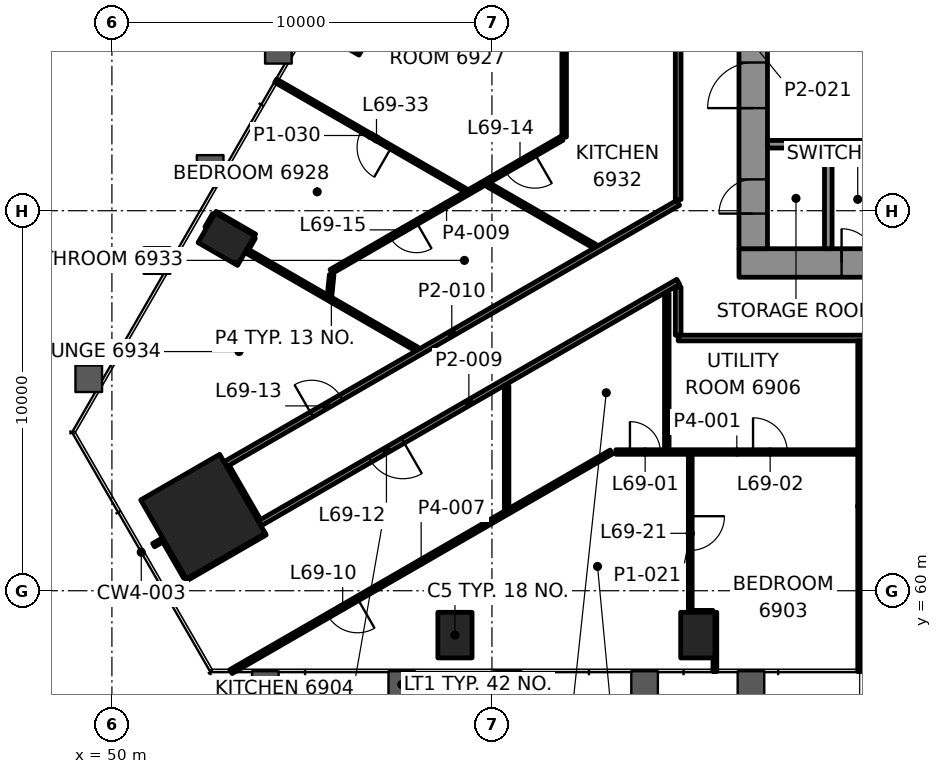
"""IFC4 building model, lengths in metres.
Left out: names, types, materials, properties, quantities, classifications, styles, units other than length and angle.
Written with IfcOpenShell. Run it as: python <this file> out.ifc"""

import sys

from ifc_helpers import new_model, si_unit, direction, frame, frame_2d, origin, origin_2d, place, context, subcontext, project, spatial, rectangle, hollow_rectangle, extrude, element, fill, save


model = new_model("IFC4")
c1 = context("Model", 3, precision=1e-05, world=origin(), true_north=direction((0.0, 1.0)))
c2 = subcontext(c1, "Body", "Model", "MODEL_VIEW")
j1 = project(units=[si_unit("LENGTHUNIT", "METRE"), si_unit("PLANEANGLEUNIT", "RADIAN")], contexts=[c1])
p1 = place(None, origin())
s1 = spatial("IfcSite", under=j1, at=p1, CompositionType="ELEMENT")
p2 = place(p1, origin())
s2 = spatial("IfcBuilding", under=s1, at=p2, CompositionType="ELEMENT")
p3 = place(p2, frame((0.0, 0.0, 288.1)))
s3 = spatial("IfcBuildingStorey", under=s2, at=p3, CompositionType="ELEMENT", Elevation=288.1)
p4 = place(p3, frame((52.396, 61.95, 0.0), z_axis=(0.0, 0.0, 1.0), x_axis=(0.5, -0.866025403784, 0.0)))
e1 = element("IfcColumn", 1, at=p4, inside=s3, PredefinedType="COLUMN", context=c2, shape_type="SweptSolid", body=[
    extrude(rectangle(XDim=2.4, YDim=2.4, at=origin_2d()), origin(), (0.0, 0.0, 1.0), 3.5),
])
for number, where, z_axis, x_axis in (
    (2, (59.027, 58.832, -0.0), (0.0, 0.0, 1.0), (1.0, 0.0, 0.0)),
    (3, (65.416, 58.832, -0.0), (0.0, 0.0, 1.0), (1.0, 0.0, 0.0)),
    (4, (56.206, 74.784, -0.0), (0.0, 0.0, 1.0), (-0.5, -0.866, 0.0)),
    (5, (53.011, 69.251, -0.0), (0.0, 0.0, 1.0), (-0.5, -0.866, 0.0)),
):
    element("IfcColumn", number, at=place(p3, frame(where, z_axis=z_axis, x_axis=x_axis)), inside=s3, PredefinedType="COLUMN", context=c2, shape_type="SweptSolid", body=[
        extrude(hollow_rectangle(XDim=0.9, YDim=1.2, WallThickness=0.06, at=origin_2d()), origin(), (0.0, 0.0, 1.0), 3.5),
    ])
p5 = place(p3, frame((66.5, 68.625, 0.0), z_axis=(0.0, 0.0, 1.0), x_axis=(1.0, 0.0, 0.0)))
e6 = element("IfcWall", 6, at=p5, inside=s3, PredefinedType="SHEAR", context=c2, shape_type="SweptSolid", body=[
    extrude(rectangle(XDim=17.0, YDim=0.75, at=frame_2d((8.5, 0.0))), origin(), (0.0, 0.0, 1.0), 3.3),
])
p6 = place(p5, frame((2.7, 0.0, 0.0)))
e7 = element("IfcOpeningElement", 7, at=p6, cuts=e6, PredefinedType="OPENING", context=c2, shape_type="SweptSolid", body=[
    extrude(rectangle(XDim=0.9, YDim=2.1, at=frame_2d((0.45, 1.05))), frame((0.0, 0.385, 0.0), z_axis=(0.0, -1.0, 0.0), x_axis=(1.0, 0.0, 0.0)), (0.0, 0.0, 1.0), 0.77),
])
p7 = place(p3, frame((66.875, 69.0, 0.0), z_axis=(0.0, 0.0, 1.0), x_axis=(0.0, 1.0, 0.0)))
e8 = element("IfcWall", 8, at=p7, inside=s3, PredefinedType="SHEAR", context=c2, shape_type="SweptSolid", body=[
    extrude(rectangle(XDim=12.0, YDim=0.75, at=frame_2d((6.0, 0.0))), origin(), (0.0, 0.0, 1.0), 3.3),
])
p8 = place(p7, frame((3.7, 0.0, 0.0)))
e9 = element("IfcOpeningElement", 9, at=p8, cuts=e8, PredefinedType="OPENING", context=c2, shape_type="SweptSolid", body=[
    extrude(rectangle(XDim=1.2, YDim=2.1, at=frame_2d((0.6, 1.05))), frame((0.0, 0.385, 0.0), z_axis=(0.0, -1.0, 0.0), x_axis=(1.0, 0.0, 0.0)), (0.0, 0.0, 1.0), 0.77),
])
p9 = place(p7, frame((0.925, 0.0, 0.0)))
e10 = element("IfcOpeningElement", 10, at=p9, cuts=e8, PredefinedType="OPENING", context=c2, shape_type="SweptSolid", body=[
    extrude(rectangle(XDim=0.9, YDim=2.1, at=frame_2d((0.45, 1.05))), frame((0.0, 0.385, 0.0), z_axis=(0.0, -1.0, 0.0), x_axis=(1.0, 0.0, 0.0)), (0.0, 0.0, 1.0), 0.77),
])
p10 = place(p3, frame((65.268, 59.432, 0.0), z_axis=(0.0, 0.0, 1.0), x_axis=(1.0, 0.0, 0.0)))
e11 = element("IfcWall", 11, at=p10, inside=s3, PredefinedType="PARTITIONING", context=c2, shape_type="SweptSolid", body=[
    extrude(rectangle(XDim=0.548, YDim=0.1, at=frame_2d((0.274, 0.0))), origin(), (0.0, 0.0, 1.0), 2.7),
])
p11 = place(p3, frame((63.261, 63.65, 0.0), z_axis=(0.0, 0.0, 1.0), x_axis=(1.0, 0.0, 0.0)))
e12 = element("IfcWall", 12, at=p11, inside=s3, PredefinedType="PARTITIONING", context=c2, shape_type="SweptSolid", body=[
    extrude(rectangle(XDim=6.364, YDim=0.12, at=frame_2d((3.182, 0.0))), origin(), (0.0, 0.0, 1.0), 2.7),
])
p12 = place(p11, frame((0.37, 0.0, 0.0)))
e13 = element("IfcOpeningElement", 13, at=p12, cuts=e12, PredefinedType="OPENING", context=c2, shape_type="SweptSolid", body=[
    extrude(rectangle(XDim=0.8, YDim=2.1, at=frame_2d((0.4, 1.05))), frame((0.0, 0.07, 0.0), z_axis=(0.0, -1.0, 0.0), x_axis=(1.0, 0.0, 0.0)), (0.0, 0.0, 1.0), 0.14),
])
p13 = place(p11, frame((3.609, 0.0, 0.0)))
e14 = element("IfcOpeningElement", 14, at=p13, cuts=e12, PredefinedType="OPENING", context=c2, shape_type="SweptSolid", body=[
    extrude(rectangle(XDim=0.9, YDim=2.1, at=frame_2d((0.45, 1.05))), frame((0.0, 0.07, 0.0), z_axis=(0.0, -1.0, 0.0), x_axis=(1.0, 0.0, 0.0)), (0.0, 0.0, 1.0), 0.14),
])
p14 = place(p3, frame((85.1, 66.65, 0.0), z_axis=(0.0, 0.0, 1.0), x_axis=(-1.0, 0.0, 0.0)))
e15 = element("IfcWall", 15, at=p14, inside=s3, PredefinedType="PARTITIONING", context=c2, shape_type="SweptSolid", body=[
    extrude(rectangle(XDim=20.2, YDim=0.15, at=frame_2d((10.1, 0.0))), origin(), (0.0, 0.0, 1.0), 2.7),
])
p15 = place(p14, frame((6.405, 0.0, 0.0)))
e16 = element("IfcOpeningElement", 16, at=p15, cuts=e15, PredefinedType="OPENING", context=c2, shape_type="SweptSolid", body=[
    extrude(rectangle(XDim=1.0, YDim=2.1, at=frame_2d((0.5, 1.05))), frame((0.0, 0.085, 0.0), z_axis=(0.0, -1.0, 0.0), x_axis=(1.0, 0.0, 0.0)), (0.0, 0.0, 1.0), 0.17),
])
p16 = place(p14, frame((12.845, 0.0, 0.0)))
e17 = element("IfcOpeningElement", 17, at=p16, cuts=e15, PredefinedType="OPENING", context=c2, shape_type="SweptSolid", body=[
    extrude(rectangle(XDim=0.9, YDim=2.1, at=frame_2d((0.45, 1.05))), frame((0.0, 0.085, 0.0), z_axis=(0.0, -1.0, 0.0), x_axis=(1.0, 0.0, 0.0)), (0.0, 0.0, 1.0), 0.17),
])
p17 = place(p3, frame((63.141, 63.65, 0.0), z_axis=(0.0, 0.0, 1.0), x_axis=(-0.866023045711, -0.500004084281, 0.0)))
e18 = element("IfcWall", 18, at=p17, inside=s3, PredefinedType="PARTITIONING", context=c2, shape_type="SweptSolid", body=[
    extrude(rectangle(XDim=11.556, YDim=0.12, at=frame_2d((5.778, 0.0))), origin(), (0.0, 0.0, 1.0), 2.7),
])
p18 = place(p17, frame((7.713, 0.0, 0.0)))
e19 = element("IfcOpeningElement", 19, at=p18, cuts=e18, PredefinedType="OPENING", context=c2, shape_type="SweptSolid", body=[
    extrude(rectangle(XDim=0.9, YDim=2.1, at=frame_2d((0.45, 1.05))), frame((0.0, 0.07, 0.0), z_axis=(0.0, -1.0, 0.0), x_axis=(1.0, 0.0, 0.0)), (0.0, 0.0, 1.0), 0.14),
])
p19 = place(p3, frame((51.957, 60.311, 0.0), z_axis=(0.0, 0.0, 1.0), x_axis=(0.866036455013, 0.499980858223, 0.0)))
e20 = element("IfcWall", 20, at=p19, inside=s3, PredefinedType="PARTITIONING", context=c2, shape_type="SweptSolid", body=[
    extrude(rectangle(XDim=2.399, YDim=0.1, at=frame_2d((1.199, 0.0))), origin(), (0.0, 0.0, 1.0), 2.7),
])
p20 = place(p3, frame((64.9, 68.13, 0.0), z_axis=(0.0, 0.0, 1.0), x_axis=(-0.866023199005, -0.500003818771, 0.0)))
e21 = element("IfcWall", 21, at=p20, inside=s3, PredefinedType="PARTITIONING", context=c2, shape_type="SweptSolid", body=[
    extrude(rectangle(XDim=12.719, YDim=0.15, at=frame_2d((6.359, 0.0))), origin(), (0.0, 0.0, 1.0), 2.547),
])
p21 = place(p20, frame((8.364, 0.0, 0.0)))
e22 = element("IfcOpeningElement", 22, at=p21, cuts=e21, PredefinedType="OPENING", context=c2, shape_type="SweptSolid", body=[
    extrude(rectangle(XDim=1.0, YDim=2.1, at=frame_2d((0.5, 1.05))), frame((0.0, 0.085, 0.0), z_axis=(0.0, -1.0, 0.0), x_axis=(1.0, 0.0, 0.0)), (0.0, 0.0, 1.0), 0.17),
])
p22 = place(p3, frame((51.097, 61.2, 0.0), z_axis=(0.0, 0.0, 1.0), x_axis=(0.866006330792, 0.500033033937, 0.0)))
e23 = element("IfcWall", 23, at=p22, inside=s3, PredefinedType="PARTITIONING", context=c2, shape_type="SweptSolid", body=[
    extrude(rectangle(XDim=0.25, YDim=0.1, at=frame_2d((0.125, 0.0))), origin(), (0.0, 0.0, 1.0), 2.7),
])
p23 = place(p3, frame((52.986, 63.329, 0.0), z_axis=(0.0, 0.0, 1.0), x_axis=(0.866027482275, 0.499996399932, 0.0)))
e24 = element("IfcWall", 24, at=p23, inside=s3, PredefinedType="PARTITIONING", context=c2, shape_type="SweptSolid", body=[
    extrude(rectangle(XDim=13.757, YDim=0.15, at=frame_2d((6.879, 0.0))), origin(), (0.0, 0.0, 1.0), 2.7),
])
p24 = place(p23, frame((2.62, 0.0, 0.0)))
e25 = element("IfcOpeningElement", 25, at=p24, cuts=e24, PredefinedType="OPENING", context=c2, shape_type="SweptSolid", body=[
    extrude(rectangle(XDim=0.9, YDim=2.1, at=frame_2d((0.45, 1.05))), frame((0.0, 0.085, 0.0), z_axis=(0.0, -1.0, 0.0), x_axis=(1.0, 0.0, 0.0)), (0.0, 0.0, 1.0), 0.17),
])
p25 = place(p3, frame((61.84, 71.906, 0.0), z_axis=(0.0, 0.0, 1.0), x_axis=(-0.866015603583, -0.500016974063, 0.0)))
e26 = element("IfcWall", 26, at=p25, inside=s3, PredefinedType="PARTITIONING", context=c2, shape_type="SweptSolid", body=[
    extrude(rectangle(XDim=7.008, YDim=0.12, at=frame_2d((3.504, 0.0))), origin(), (0.0, 0.0, 1.0), 2.7),
])
p26 = place(p25, frame((0.822, 0.0, 0.0)))
e27 = element("IfcOpeningElement", 27, at=p26, cuts=e26, PredefinedType="OPENING", context=c2, shape_type="SweptSolid", body=[
    extrude(rectangle(XDim=0.9, YDim=2.1, at=frame_2d((0.45, 1.05))), frame((0.0, 0.07, 0.0), z_axis=(0.0, -1.0, 0.0), x_axis=(1.0, 0.0, 0.0)), (0.0, 0.0, 1.0), 0.14),
])
p27 = place(p25, frame((4.418, 0.0, 0.0)))
e28 = element("IfcOpeningElement", 28, at=p27, cuts=e26, PredefinedType="OPENING", context=c2, shape_type="SweptSolid", body=[
    extrude(rectangle(XDim=0.8, YDim=2.1, at=frame_2d((0.4, 1.05))), frame((0.0, 0.07, 0.0), z_axis=(0.0, -1.0, 0.0), x_axis=(1.0, 0.0, 0.0)), (0.0, 0.0, 1.0), 0.14),
])
p28 = place(p3, frame((53.561, 69.003, 0.0), z_axis=(0.0, 0.0, 1.0), x_axis=(0.500241622161, 0.865885858216, 0.0)))
e29 = element("IfcWall", 29, at=p28, inside=s3, PredefinedType="PARTITIONING", context=c2, shape_type="SweptSolid", body=[
    extrude(rectangle(XDim=0.339, YDim=0.1, at=frame_2d((0.169, 0.0))), origin(), (0.0, 0.0, 1.0), 2.7),
])
p29 = place(p3, frame((52.491, 69.551, 0.0), z_axis=(0.0, 0.0, 1.0), x_axis=(0.499951716245, 0.866053278629, 0.0)))
e30 = element("IfcWall", 30, at=p29, inside=s3, PredefinedType="PARTITIONING", context=c2, shape_type="SweptSolid", body=[
    extrude(rectangle(XDim=0.399, YDim=0.1, at=frame_2d((0.2, 0.0))), origin(), (0.0, 0.0, 1.0), 2.7),
])
p30 = place(p3, frame((55.729, 67.781, 0.0), z_axis=(0.0, 0.0, 1.0), x_axis=(0.099548724898, 0.995032688594, 0.0)))
e31 = element("IfcWall", 31, at=p30, inside=s3, PredefinedType="PARTITIONING", context=c2, shape_type="SweptSolid", body=[
    extrude(rectangle(XDim=0.537, YDim=0.12, at=frame_2d((0.269, 0.0))), origin(), (0.0, 0.0, 1.0), 2.7),
])
p31 = place(p3, frame((69.676, 57.872, 0.0), z_axis=(0.0, 0.0, 1.0), x_axis=(0.0, 1.0, 0.0)))
e32 = element("IfcWall", 32, at=p31, inside=s3, PredefinedType="PARTITIONING", context=c2, shape_type="SweptSolid", body=[
    extrude(rectangle(XDim=8.703, YDim=0.1, at=frame_2d((4.352, 0.0))), origin(), (0.0, 0.0, 1.0), 2.688),
])
p32 = place(p3, frame((65.866, 57.872, 0.0), z_axis=(0.0, 0.0, 1.0), x_axis=(0.0, 1.0, 0.0)))
e33 = element("IfcWall", 33, at=p32, inside=s3, PredefinedType="PARTITIONING", context=c2, shape_type="SweptSolid", body=[
    extrude(rectangle(XDim=1.56, YDim=0.1, at=frame_2d((0.78, 0.0))), origin(), (0.0, 0.0, 1.0), 2.688),
])
p33 = place(p3, frame((65.218, 63.59, 0.0), z_axis=(0.0, 0.0, 1.0), x_axis=(0.0, -1.0, 0.0)))
e34 = element("IfcWall", 34, at=p33, inside=s3, PredefinedType="PARTITIONING", context=c2, shape_type="SweptSolid", body=[
    extrude(rectangle(XDim=4.158, YDim=0.1, at=frame_2d((2.079, 0.0))), origin(), (0.0, 0.0, 1.0), 2.7),
])
p34 = place(p33, frame((1.629, 0.0, 0.0)))
e35 = element("IfcOpeningElement", 35, at=p34, cuts=e34, PredefinedType="OPENING", context=c2, shape_type="SweptSolid", body=[
    extrude(rectangle(XDim=0.9, YDim=2.1, at=frame_2d((0.45, 1.05))), frame((0.0, 0.06, 0.0), z_axis=(0.0, -1.0, 0.0), x_axis=(1.0, 0.0, 0.0)), (0.0, 0.0, 1.0), 0.12),
])
p35 = place(p3, frame((64.9, 66.725, 0.0), z_axis=(0.0, 0.0, 1.0), x_axis=(0.0, 1.0, 0.0)))
e36 = element("IfcWall", 36, at=p35, inside=s3, PredefinedType="PARTITIONING", context=c2, shape_type="SweptSolid", body=[
    extrude(rectangle(XDim=1.268, YDim=0.15, at=frame_2d((0.634, 0.0))), origin(), (0.0, 0.0, 1.0), 2.547),
])
p36 = place(p3, frame((64.9, 70.295, 0.0), z_axis=(0.0, 0.0, 1.0), x_axis=(0.0, 1.0, 0.0)))
e37 = element("IfcWall", 37, at=p36, inside=s3, PredefinedType="PARTITIONING", context=c2, shape_type="SweptSolid", body=[
    extrude(rectangle(XDim=13.055, YDim=0.15, at=frame_2d((6.528, 0.0))), origin(), (0.0, 0.0, 1.0), 2.7),
])
p37 = place(p36, frame((8.07, 0.0, 0.0)))
e38 = element("IfcOpeningElement", 38, at=p37, cuts=e37, PredefinedType="OPENING", context=c2, shape_type="SweptSolid", body=[
    extrude(rectangle(XDim=1.0, YDim=2.1, at=frame_2d((0.5, 1.05))), frame((0.0, 0.085, 0.0), z_axis=(0.0, -1.0, 0.0), x_axis=(1.0, 0.0, 0.0)), (0.0, 0.0, 1.0), 0.17),
])
p38 = place(p3, frame((64.601, 63.71, 0.0), z_axis=(0.0, 0.0, 1.0), x_axis=(0.0, 1.0, 0.0)))
e39 = element("IfcWall", 39, at=p38, inside=s3, PredefinedType="PARTITIONING", context=c2, shape_type="SweptSolid", body=[
    extrude(rectangle(XDim=4.12, YDim=0.12, at=frame_2d((2.06, 0.0))), origin(), (0.0, 0.0, 1.0), 2.547),
])
p39 = place(p3, frame((61.9, 71.94, 0.0), z_axis=(0.0, 0.0, 1.0), x_axis=(0.0, 1.0, 0.0)))
e40 = element("IfcWall", 40, at=p39, inside=s3, PredefinedType="PARTITIONING", context=c2, shape_type="SweptSolid", body=[
    extrude(rectangle(XDim=13.792, YDim=0.12, at=frame_2d((6.896, 0.0))), origin(), (0.0, 0.0, 1.0), 2.688),
])
p40 = place(p39, frame((8.206, 0.0, 0.0)))
e41 = element("IfcOpeningElement", 41, at=p40, cuts=e40, PredefinedType="OPENING", context=c2, shape_type="SweptSolid", body=[
    extrude(rectangle(XDim=0.9, YDim=2.1, at=frame_2d((0.45, 1.05))), frame((0.0, 0.07, 0.0), z_axis=(0.0, -1.0, 0.0), x_axis=(1.0, 0.0, 0.0)), (0.0, 0.0, 1.0), 0.14),
])
p41 = place(p3, frame((60.386, 62.169, 0.0), z_axis=(0.0, 0.0, 1.0), x_axis=(0.0, 1.0, 0.0)))
e42 = element("IfcWall", 42, at=p41, inside=s3, PredefinedType="PARTITIONING", context=c2, shape_type="SweptSolid", body=[
    extrude(rectangle(XDim=3.228, YDim=0.12, at=frame_2d((1.614, 0.0))), origin(), (0.0, 0.0, 1.0), 2.547),
])
p42 = place(p3, frame((53.845, 61.84, 0.0), z_axis=(0.0, 0.0, 1.0), x_axis=(-0.499988108725, 0.866032269107, 0.0)))
e43 = element("IfcWall", 43, at=p42, inside=s3, PredefinedType="PARTITIONING", context=c2, shape_type="SweptSolid", body=[
    extrude(rectangle(XDim=1.644, YDim=0.15, at=frame_2d((0.822, 0.0))), origin(), (0.0, 0.0, 1.0), 2.547),
])
p43 = place(p3, frame((51.931, 60.354, 0.0), z_axis=(0.0, 0.0, 1.0), x_axis=(-0.499955427682, 0.866051136095, 0.0)))
e44 = element("IfcWall", 44, at=p43, inside=s3, PredefinedType="PARTITIONING", context=c2, shape_type="SweptSolid", body=[
    extrude(rectangle(XDim=1.149, YDim=0.1, at=frame_2d((0.574, 0.0))), origin(), (0.0, 0.0, 1.0), 2.7),
])
p44 = place(p3, frame((62.702, 69.066, 0.0), z_axis=(0.0, 0.0, 1.0), x_axis=(-0.866033195618, 0.499986503906, 0.0)))
e45 = element("IfcWall", 45, at=p44, inside=s3, PredefinedType="PARTITIONING", context=c2, shape_type="SweptSolid", body=[
    extrude(rectangle(XDim=3.228, YDim=0.12, at=frame_2d((1.614, 0.0))), origin(), (0.0, 0.0, 1.0), 2.7),
])
p45 = place(p3, frame((59.301, 70.539, 0.0), z_axis=(0.0, 0.0, 1.0), x_axis=(-0.866021213215, 0.500007258209, 0.0)))
e46 = element("IfcWall", 46, at=p45, inside=s3, PredefinedType="PARTITIONING", context=c2, shape_type="SweptSolid", body=[
    extrude(rectangle(XDim=5.763, YDim=0.1, at=frame_2d((2.882, 0.0))), origin(), (0.0, 0.0, 1.0), 2.7),
])
p46 = place(p45, frame((2.252, 0.0, 0.0)))
e47 = element("IfcOpeningElement", 47, at=p46, cuts=e46, PredefinedType="OPENING", context=c2, shape_type="SweptSolid", body=[
    extrude(rectangle(XDim=0.9, YDim=2.1, at=frame_2d((0.45, 1.05))), frame((0.0, 0.06, 0.0), z_axis=(0.0, -1.0, 0.0), x_axis=(1.0, 0.0, 0.0)), (0.0, 0.0, 1.0), 0.12),
])
p47 = place(p3, frame((53.756, 69.341, 0.0), z_axis=(0.0, 0.0, 1.0), x_axis=(-0.866066905393, 0.499928110214, 0.0)))
e48 = element("IfcWall", 48, at=p47, inside=s3, PredefinedType="PARTITIONING", context=c2, shape_type="SweptSolid", body=[
    extrude(rectangle(XDim=1.199, YDim=0.1, at=frame_2d((0.6, 0.0))), origin(), (0.0, 0.0, 1.0), 2.7),
])
p48 = place(p3, frame((58.017, 66.361, 0.0), z_axis=(0.0, 0.0, 1.0), x_axis=(-0.866018392704, 0.500012143352, 0.0)))
e49 = element("IfcWall", 49, at=p48, inside=s3, PredefinedType="PARTITIONING", context=c2, shape_type="SweptSolid", body=[
    extrude(rectangle(XDim=5.179, YDim=0.12, at=frame_2d((2.59, 0.0))), origin(), (0.0, 0.0, 1.0), 2.7),
])
p49 = place(p3, frame((67.25, 71.75, 0.0), z_axis=(0.0, 0.0, 1.0), x_axis=(1.0, 0.0, 0.0)))
e50 = element("IfcWall", 50, at=p49, inside=s3, PredefinedType="PARTITIONING", context=c2, shape_type="SweptSolid", body=[
    extrude(rectangle(XDim=3.05, YDim=0.2, at=frame_2d((1.525, 0.0))), origin(), (0.0, 0.0, 1.0), 3.3),
])
p50 = place(p3, frame((68.85, 69.0, 0.0), z_axis=(0.0, 0.0, 1.0), x_axis=(0.0, 1.0, 0.0)))
e51 = element("IfcWall", 51, at=p50, inside=s3, PredefinedType="PARTITIONING", context=c2, shape_type="SweptSolid", body=[
    extrude(rectangle(XDim=2.65, YDim=0.2, at=frame_2d((1.325, 0.0))), origin(), (0.0, 0.0, 1.0), 3.3),
])
p51 = place(p12, origin())
e52 = element("IfcDoor", 52, at=p51, inside=s3, OperationType="SINGLE_SWING_RIGHT", PredefinedType="DOOR", context=c2, shape_type="SweptSolid", body=[
    extrude(rectangle(XDim=0.8, YDim=2.1, at=frame_2d((0.4, 1.05))), frame((0.0, 0.025, 0.0), z_axis=(0.0, -1.0, 0.0), x_axis=(1.0, 0.0, 0.0)), (0.0, 0.0, 1.0), 0.05),
])
fill(e13, e52)
p52 = place(p13, origin())
e53 = element("IfcDoor", 53, at=p52, inside=s3, OperationType="SINGLE_SWING_LEFT", PredefinedType="DOOR", context=c2, shape_type="SweptSolid", body=[
    extrude(rectangle(XDim=0.9, YDim=2.1, at=frame_2d((0.45, 1.05))), frame((0.0, 0.025, 0.0), z_axis=(0.0, -1.0, 0.0), x_axis=(1.0, 0.0, 0.0)), (0.0, 0.0, 1.0), 0.05),
])
fill(e14, e53)
p53 = place(p18, origin())
e54 = element("IfcDoor", 54, at=p53, inside=s3, OperationType="SINGLE_SWING_RIGHT", PredefinedType="DOOR", context=c2, shape_type="SweptSolid", body=[
    extrude(rectangle(XDim=0.9, YDim=2.1, at=frame_2d((0.45, 1.05))), frame((0.0, 0.025, 0.0), z_axis=(0.0, -1.0, 0.0), x_axis=(1.0, 0.0, 0.0)), (0.0, 0.0, 1.0), 0.05),
])
fill(e19, e54)
p54 = place(p21, origin())
e55 = element("IfcDoor", 55, at=p54, inside=s3, OperationType="SINGLE_SWING_LEFT", PredefinedType="DOOR", context=c2, shape_type="SweptSolid", body=[
    extrude(rectangle(XDim=1.0, YDim=2.1, at=frame_2d((0.5, 1.05))), frame((0.0, 0.025, 0.0), z_axis=(0.0, -1.0, 0.0), x_axis=(1.0, 0.0, 0.0)), (0.0, 0.0, 1.0), 0.05),
])
fill(e22, e55)
p55 = place(p24, origin())
e56 = element("IfcDoor", 56, at=p55, inside=s3, OperationType="SINGLE_SWING_LEFT", PredefinedType="DOOR", context=c2, shape_type="SweptSolid", body=[
    extrude(rectangle(XDim=0.9, YDim=2.1, at=frame_2d((0.45, 1.05))), frame((0.0, 0.025, 0.0), z_axis=(0.0, -1.0, 0.0), x_axis=(1.0, 0.0, 0.0)), (0.0, 0.0, 1.0), 0.05),
])
fill(e25, e56)
p56 = place(p26, origin())
e57 = element("IfcDoor", 57, at=p56, inside=s3, OperationType="SINGLE_SWING_LEFT", PredefinedType="DOOR", context=c2, shape_type="SweptSolid", body=[
    extrude(rectangle(XDim=0.9, YDim=2.1, at=frame_2d((0.45, 1.05))), frame((0.0, 0.025, 0.0), z_axis=(0.0, -1.0, 0.0), x_axis=(1.0, 0.0, 0.0)), (0.0, 0.0, 1.0), 0.05),
])
fill(e27, e57)
p57 = place(p27, origin())
e58 = element("IfcDoor", 58, at=p57, inside=s3, OperationType="SINGLE_SWING_LEFT", PredefinedType="DOOR", context=c2, shape_type="SweptSolid", body=[
    extrude(rectangle(XDim=0.8, YDim=2.1, at=frame_2d((0.4, 1.05))), frame((0.0, 0.025, 0.0), z_axis=(0.0, -1.0, 0.0), x_axis=(1.0, 0.0, 0.0)), (0.0, 0.0, 1.0), 0.05),
])
fill(e28, e58)
p58 = place(p34, origin())
e59 = element("IfcDoor", 59, at=p58, inside=s3, OperationType="SINGLE_SWING_RIGHT", PredefinedType="DOOR", context=c2, shape_type="SweptSolid", body=[
    extrude(rectangle(XDim=0.9, YDim=2.1, at=frame_2d((0.45, 1.05))), frame((0.0, 0.025, 0.0), z_axis=(0.0, -1.0, 0.0), x_axis=(1.0, 0.0, 0.0)), (0.0, 0.0, 1.0), 0.05),
])
fill(e35, e59)
p59 = place(p46, origin())
e60 = element("IfcDoor", 60, at=p59, inside=s3, OperationType="SINGLE_SWING_LEFT", PredefinedType="DOOR", context=c2, shape_type="SweptSolid", body=[
    extrude(rectangle(XDim=0.9, YDim=2.1, at=frame_2d((0.45, 1.05))), frame((0.0, 0.025, 0.0), z_axis=(0.0, -1.0, 0.0), x_axis=(1.0, 0.0, 0.0)), (0.0, 0.0, 1.0), 0.05),
])
fill(e47, e60)
p60 = place(p8, origin())
e61 = element("IfcDoor", 61, at=p60, inside=s3, OperationType="SINGLE_SWING_RIGHT", PredefinedType="DOOR", context=c2, shape_type="SweptSolid", body=[
    extrude(rectangle(XDim=1.2, YDim=2.1, at=frame_2d((0.6, 1.05))), frame((0.0, 0.095, 0.0), z_axis=(0.0, -1.0, 0.0), x_axis=(1.0, 0.0, 0.0)), (0.0, 0.0, 1.0), 0.19),
])
fill(e9, e61)
p61 = place(p9, origin())
e62 = element("IfcDoor", 62, at=p61, inside=s3, OperationType="SINGLE_SWING_RIGHT", PredefinedType="DOOR", context=c2, shape_type="SweptSolid", body=[
    extrude(rectangle(XDim=0.9, YDim=2.1, at=frame_2d((0.45, 1.05))), frame((0.0, 0.095, 0.0), z_axis=(0.0, -1.0, 0.0), x_axis=(1.0, 0.0, 0.0)), (0.0, 0.0, 1.0), 0.19),
])
fill(e10, e62)
p62 = place(p6, origin())
e63 = element("IfcDoor", 63, at=p62, inside=s3, OperationType="SINGLE_SWING_LEFT", PredefinedType="DOOR", context=c2, shape_type="SweptSolid", body=[
    extrude(rectangle(XDim=0.9, YDim=2.1, at=frame_2d((0.45, 1.05))), frame((0.0, 0.095, 0.0), z_axis=(0.0, -1.0, 0.0), x_axis=(1.0, 0.0, 0.0)), (0.0, 0.0, 1.0), 0.19),
])
fill(e7, e63)
save(model, sys.argv[1])
